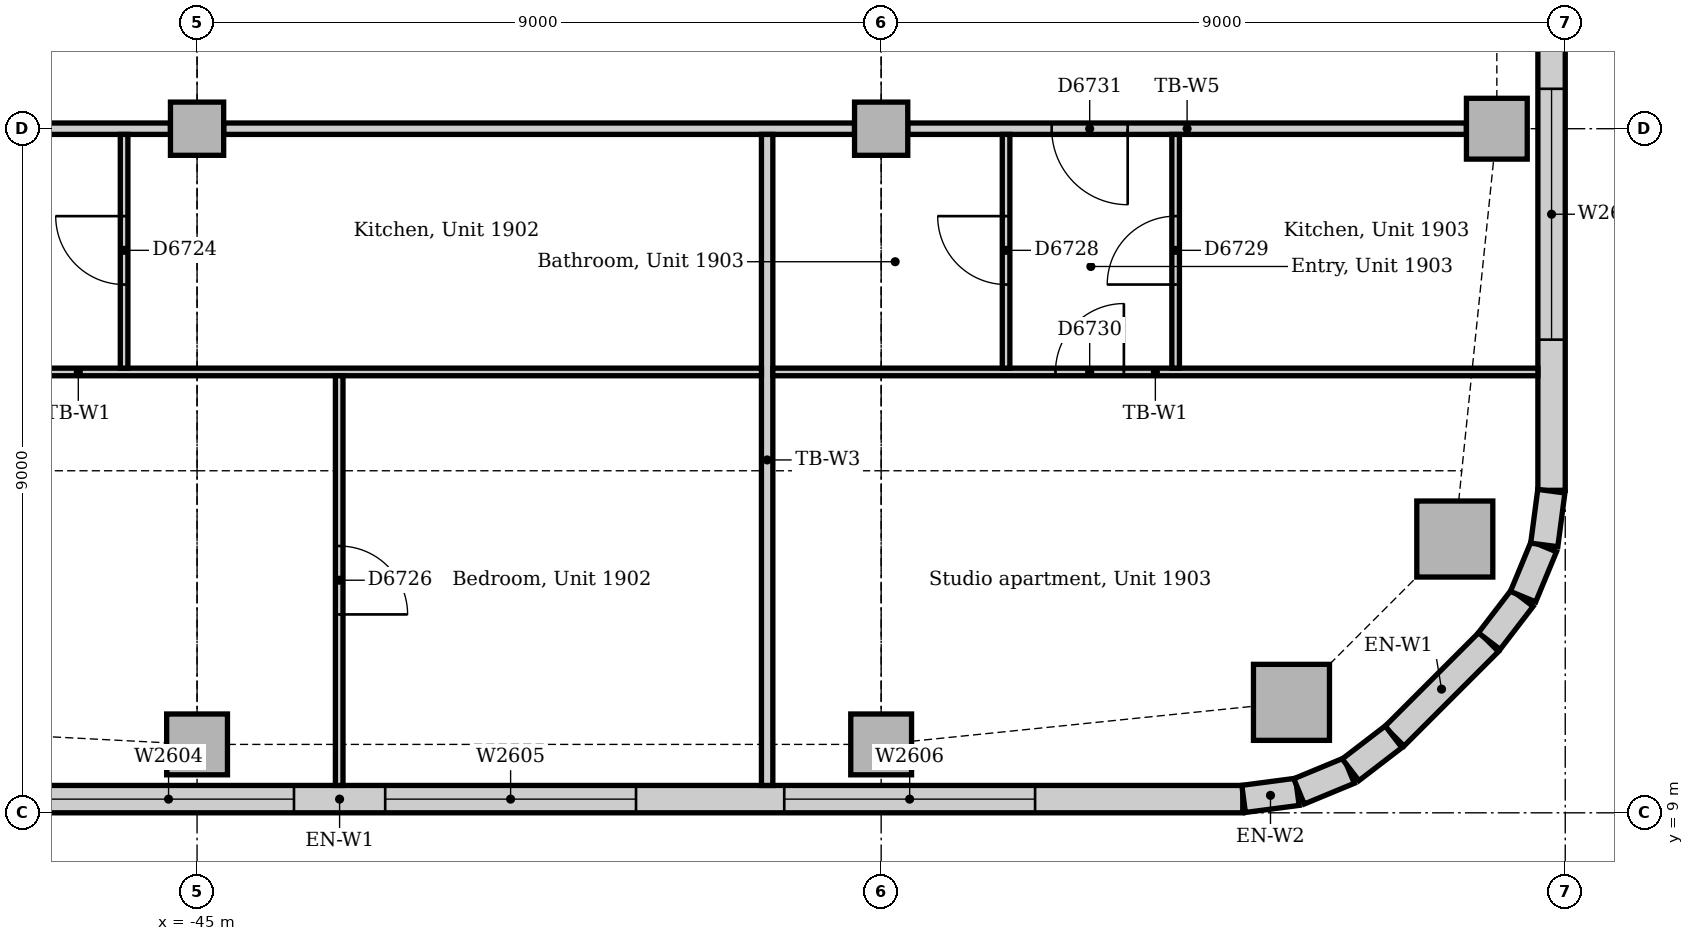
"""IFC4 building model, lengths in metres.
Left out: names, types, materials, properties, quantities, classifications, styles, units other than length and angle.
Written with IfcOpenShell. Run it as: python <this file> out.ifc"""

import sys

from ifc_helpers import new_model, si_unit, direction, frame, frame_2d, origin, origin_2d, place, context, subcontext, project, spatial, rectangle, extrude, element, fill, save


model = new_model("IFC4")
c1 = context("Model", 3, precision=1e-05, world=origin(), true_north=direction((0.0, 1.0)))
c2 = subcontext(c1, "Body", "Model", "MODEL_VIEW")
j1 = project(units=[si_unit("LENGTHUNIT", "METRE"), si_unit("PLANEANGLEUNIT", "RADIAN")], contexts=[c1])
p1 = place(None, origin())
s1 = spatial("IfcSite", under=j1, at=p1, CompositionType="ELEMENT")
p2 = place(p1, origin())
s2 = spatial("IfcBuilding", under=s1, at=p2, CompositionType="ELEMENT")
p3 = place(p2, frame((0.0, 0.0, 83.0)))
s3 = spatial("IfcBuildingStorey", under=s2, at=p3, CompositionType="ELEMENT", Elevation=83.0)
for number, where, z_axis, x_axis in (
    (1, (-30.602, 10.453, 0.0), (0.0, 0.0, 1.0), (1.0, 0.0, 0.0)),
    (2, (-28.453, 12.602, 0.0), (0.0, 0.0, 1.0), (1.0, 0.0, 0.0)),
):
    element("IfcColumn", number, at=place(p3, frame(where, z_axis=z_axis, x_axis=x_axis)), inside=s3, PredefinedType="COLUMN", context=c2, shape_type="SweptSolid", body=[
        extrude(rectangle(XDim=1.0, YDim=1.0, at=origin_2d()), origin(), (0.0, 0.0, 1.0), 3.85),
    ])
for number, where, z_axis, x_axis in (
    (3, (-45.0, 9.9, 0.0), (0.0, 0.0, 1.0), (1.0, 0.0, 0.0)),
    (4, (-36.0, 9.9, 0.0), (0.0, 0.0, 1.0), (1.0, 0.0, 0.0)),
    (5, (-27.9, 18.0, 0.0), (0.0, 0.0, 1.0), (1.0, 0.0, 0.0)),
):
    element("IfcColumn", number, at=place(p3, frame(where, z_axis=z_axis, x_axis=x_axis)), inside=s3, PredefinedType="COLUMN", context=c2, shape_type="SweptSolid", body=[
        extrude(rectangle(XDim=0.8, YDim=0.8, at=origin_2d()), origin(), (0.0, 0.0, 1.0), 3.85),
    ])
for number, where, z_axis, x_axis in (
    (6, (-45.0, 18.0, 0.0), (0.0, 0.0, 1.0), (1.0, 0.0, 0.0)),
    (7, (-36.0, 18.0, 0.0), (0.0, 0.0, 1.0), (1.0, 0.0, 0.0)),
):
    element("IfcColumn", number, at=place(p3, frame(where, z_axis=z_axis, x_axis=x_axis)), inside=s3, PredefinedType="COLUMN", context=c2, shape_type="SweptSolid", body=[
        extrude(rectangle(XDim=0.7, YDim=0.7, at=origin_2d()), origin(), (0.0, 0.0, 1.0), 3.85),
    ])
p4 = place(p3, frame((-55.007, 9.18, 0.0), z_axis=(0.0, 0.0, 1.0), x_axis=(1.0, 0.0, 0.0)))
e8 = element("IfcWall", 8, at=p4, inside=s3, PredefinedType="STANDARD", context=c2, shape_type="SweptSolid", body=[
    extrude(rectangle(XDim=23.765, YDim=0.36, at=frame_2d((11.882, 0.0))), origin(), (0.0, 0.0, 1.0), 3.85),
])
p5 = place(p4, frame((3.482, 0.0, 0.9)))
e9 = element("IfcOpeningElement", 9, at=p5, cuts=e8, PredefinedType="OPENING", context=c2, shape_type="SweptSolid", body=[
    extrude(rectangle(XDim=3.3, YDim=1.6, at=frame_2d((1.65, 0.8))), frame((0.0, 0.19, 0.0), z_axis=(0.0, -1.0, 0.0), x_axis=(1.0, 0.0, 0.0)), (0.0, 0.0, 1.0), 0.38),
])
p6 = place(p4, frame((7.982, 0.0, 0.9)))
e10 = element("IfcOpeningElement", 10, at=p6, cuts=e8, PredefinedType="OPENING", context=c2, shape_type="SweptSolid", body=[
    extrude(rectangle(XDim=3.3, YDim=1.6, at=frame_2d((1.65, 0.8))), frame((0.0, 0.19, 0.0), z_axis=(0.0, -1.0, 0.0), x_axis=(1.0, 0.0, 0.0)), (0.0, 0.0, 1.0), 0.38),
])
p7 = place(p4, frame((12.482, 0.0, 0.9)))
e11 = element("IfcOpeningElement", 11, at=p7, cuts=e8, PredefinedType="OPENING", context=c2, shape_type="SweptSolid", body=[
    extrude(rectangle(XDim=3.3, YDim=1.6, at=frame_2d((1.65, 0.8))), frame((0.0, 0.19, 0.0), z_axis=(0.0, -1.0, 0.0), x_axis=(1.0, 0.0, 0.0)), (0.0, 0.0, 1.0), 0.38),
])
p8 = place(p4, frame((17.732, 0.0, 0.9)))
e12 = element("IfcOpeningElement", 12, at=p8, cuts=e8, PredefinedType="OPENING", context=c2, shape_type="SweptSolid", body=[
    extrude(rectangle(XDim=3.3, YDim=1.6, at=frame_2d((1.65, 0.8))), frame((0.0, 0.19, 0.0), z_axis=(0.0, -1.0, 0.0), x_axis=(1.0, 0.0, 0.0)), (0.0, 0.0, 1.0), 0.38),
])
p9 = place(p3, frame((-29.249, 10.006, 0.0), z_axis=(0.0, 0.0, 1.0), x_axis=(0.707106781187, 0.707106781187, 0.0)))
e13 = element("IfcWall", 13, at=p9, inside=s3, PredefinedType="STANDARD", context=c2, shape_type="SweptSolid", body=[
    extrude(rectangle(XDim=1.757, YDim=0.36, at=frame_2d((0.879, 0.0))), origin(), (0.0, 0.0, 1.0), 3.85),
])
p10 = place(p3, frame((-27.18, 13.243, 0.0), z_axis=(0.0, 0.0, 1.0), x_axis=(0.0, 1.0, 0.0)))
e14 = element("IfcWall", 14, at=p10, inside=s3, PredefinedType="STANDARD", context=c2, shape_type="SweptSolid", body=[
    extrude(rectangle(XDim=7.757, YDim=0.36, at=frame_2d((3.879, 0.0))), origin(), (0.0, 0.0, 1.0), 3.85),
])
p11 = place(p10, frame((1.982, 0.0, 0.9)))
e15 = element("IfcOpeningElement", 15, at=p11, cuts=e14, PredefinedType="OPENING", context=c2, shape_type="SweptSolid", body=[
    extrude(rectangle(XDim=3.3, YDim=1.6, at=frame_2d((1.65, 0.8))), frame((0.0, 0.19, 0.0), z_axis=(0.0, -1.0, 0.0), x_axis=(1.0, 0.0, 0.0)), (0.0, 0.0, 1.0), 0.38),
])
for number, where, z_axis, x_axis in (
    (16, (-31.231, 9.183, 0.0), (0.0, 0.0, 1.0), (0.991, 0.131, 0.0)),
    (17, (-30.503, 9.282, 0.0), (0.0, 0.0, 1.0), (0.924, 0.383, 0.0)),
):
    element("IfcWall", number, at=place(p3, frame(where, z_axis=z_axis, x_axis=x_axis)), inside=s3, PredefinedType="STANDARD", context=c2, shape_type="SweptSolid", body=[
        extrude(rectangle(XDim=0.713, YDim=0.36, at=frame_2d((0.356, 0.0))), origin(), (0.0, 0.0, 1.0), 3.85),
    ])
for number, where, z_axis, x_axis in (
    (18, (-29.825, 9.566, 0.0), (0.0, 0.0, 1.0), (0.793, 0.609, 0.0)),
    (19, (-28.0, 11.259, 0.0), (0.0, 0.0, 1.0), (0.609, 0.793, 0.0)),
):
    element("IfcWall", number, at=place(p3, frame(where, z_axis=z_axis, x_axis=x_axis)), inside=s3, PredefinedType="STANDARD", context=c2, shape_type="SweptSolid", body=[
        extrude(rectangle(XDim=0.713, YDim=0.36, at=frame_2d((0.357, 0.0))), origin(), (0.0, 0.0, 1.0), 3.85),
    ])
for number, where, z_axis, x_axis in (
    (20, (-27.555, 11.844, 0.0), (0.0, 0.0, 1.0), (0.383, 0.924, 0.0)),
    (21, (-27.276, 12.524, 0.0), (0.0, 0.0, 1.0), (0.131, 0.991, 0.0)),
):
    element("IfcWall", number, at=place(p3, frame(where, z_axis=z_axis, x_axis=x_axis)), inside=s3, PredefinedType="STANDARD", context=c2, shape_type="SweptSolid", body=[
        extrude(rectangle(XDim=0.713, YDim=0.36, at=frame_2d((0.356, 0.0))), origin(), (0.0, 0.0, 1.0), 3.85),
    ])
p12 = place(p3, frame((-35.65, 18.0, 0.0), z_axis=(0.0, 0.0, 1.0), x_axis=(1.0, 0.0, 0.0)))
e22 = element("IfcWall", 22, at=p12, inside=s3, PredefinedType="PARTITIONING", context=c2, shape_type="SweptSolid", body=[
    extrude(rectangle(XDim=7.35, YDim=0.15, at=frame_2d((3.675, 0.0))), origin(), (0.0, 0.0, 1.0), 3.158),
])
p13 = place(p12, frame((1.893, 0.0, 0.0)))
e23 = element("IfcOpeningElement", 23, at=p13, cuts=e22, PredefinedType="OPENING", context=c2, shape_type="SweptSolid", body=[
    extrude(rectangle(XDim=1.0, YDim=2.1, at=frame_2d((0.5, 1.05))), frame((0.0, 0.085, 0.0), z_axis=(0.0, -1.0, 0.0), x_axis=(1.0, 0.0, 0.0)), (0.0, 0.0, 1.0), 0.17),
])
p14 = place(p3, frame((-44.65, 18.0, 0.0), z_axis=(0.0, 0.0, 1.0), x_axis=(1.0, 0.0, 0.0)))
e24 = element("IfcWall", 24, at=p14, inside=s3, PredefinedType="PARTITIONING", context=c2, shape_type="SweptSolid", body=[
    extrude(rectangle(XDim=8.3, YDim=0.15, at=frame_2d((4.15, 0.0))), origin(), (0.0, 0.0, 1.0), 3.158),
])
p15 = place(p3, frame((-53.65, 18.0, 0.0), z_axis=(0.0, 0.0, 1.0), x_axis=(1.0, 0.0, 0.0)))
e25 = element("IfcWall", 25, at=p15, inside=s3, PredefinedType="PARTITIONING", context=c2, shape_type="SweptSolid", body=[
    extrude(rectangle(XDim=8.3, YDim=0.15, at=frame_2d((4.15, 0.0))), origin(), (0.0, 0.0, 1.0), 3.158),
])
p16 = place(p15, frame((5.23, 0.0, 0.0)))
e26 = element("IfcOpeningElement", 26, at=p16, cuts=e25, PredefinedType="OPENING", context=c2, shape_type="SweptSolid", body=[
    extrude(rectangle(XDim=1.0, YDim=2.1, at=frame_2d((0.5, 1.05))), frame((0.0, 0.085, 0.0), z_axis=(0.0, -1.0, 0.0), x_axis=(1.0, 0.0, 0.0)), (0.0, 0.0, 1.0), 0.17),
])
p17 = place(p3, frame((-37.5, 9.36, 0.0), z_axis=(0.0, 0.0, 1.0), x_axis=(0.0, 1.0, 0.0)))
e27 = element("IfcWall", 27, at=p17, inside=s3, PredefinedType="PARTITIONING", context=c2, shape_type="SweptSolid", body=[
    extrude(rectangle(XDim=8.565, YDim=0.15, at=frame_2d((4.282, 0.0))), origin(), (0.0, 0.0, 1.0), 3.85),
])
p18 = place(p3, frame((-55.55, 14.8, 0.0), z_axis=(0.0, 0.0, 1.0), x_axis=(1.0, 0.0, 0.0)))
e28 = element("IfcWall", 28, at=p18, inside=s3, PredefinedType="PARTITIONING", context=c2, shape_type="SweptSolid", body=[
    extrude(rectangle(XDim=17.975, YDim=0.1, at=frame_2d((8.988, 0.0))), origin(), (0.0, 0.0, 1.0), 3.85),
])
p19 = place(p18, frame((7.18, 0.0, 0.0)))
e29 = element("IfcOpeningElement", 29, at=p19, cuts=e28, PredefinedType="OPENING", context=c2, shape_type="SweptSolid", body=[
    extrude(rectangle(XDim=0.9, YDim=2.1, at=frame_2d((0.45, 1.05))), frame((0.0, 0.06, 0.0), z_axis=(0.0, -1.0, 0.0), x_axis=(1.0, 0.0, 0.0)), (0.0, 0.0, 1.0), 0.12),
])
p20 = place(p3, frame((-37.425, 14.8, 0.0), z_axis=(0.0, 0.0, 1.0), x_axis=(1.0, 0.0, 0.0)))
e30 = element("IfcWall", 30, at=p20, inside=s3, PredefinedType="PARTITIONING", context=c2, shape_type="SweptSolid", body=[
    extrude(rectangle(XDim=10.065, YDim=0.1, at=frame_2d((5.032, 0.0))), origin(), (0.0, 0.0, 1.0), 3.85),
])
p21 = place(p20, frame((3.718, 0.0, 0.0)))
e31 = element("IfcOpeningElement", 31, at=p21, cuts=e30, PredefinedType="OPENING", context=c2, shape_type="SweptSolid", body=[
    extrude(rectangle(XDim=0.9, YDim=2.1, at=frame_2d((0.45, 1.05))), frame((0.0, 0.06, 0.0), z_axis=(0.0, -1.0, 0.0), x_axis=(1.0, 0.0, 0.0)), (0.0, 0.0, 1.0), 0.12),
])
p22 = place(p3, frame((-43.13, 9.36, 0.0), z_axis=(0.0, 0.0, 1.0), x_axis=(0.0, 1.0, 0.0)))
e32 = element("IfcWall", 32, at=p22, inside=s3, PredefinedType="PARTITIONING", context=c2, shape_type="SweptSolid", body=[
    extrude(rectangle(XDim=5.39, YDim=0.1, at=frame_2d((2.695, 0.0))), origin(), (0.0, 0.0, 1.0), 3.85),
])
p23 = place(p22, frame((2.25, 0.0, 0.0)))
e33 = element("IfcOpeningElement", 33, at=p23, cuts=e32, PredefinedType="OPENING", context=c2, shape_type="SweptSolid", body=[
    extrude(rectangle(XDim=0.9, YDim=2.1, at=frame_2d((0.45, 1.05))), frame((0.0, 0.06, 0.0), z_axis=(0.0, -1.0, 0.0), x_axis=(1.0, 0.0, 0.0)), (0.0, 0.0, 1.0), 0.12),
])
p24 = place(p3, frame((-45.96, 14.85, 0.0), z_axis=(0.0, 0.0, 1.0), x_axis=(0.0, 1.0, 0.0)))
e34 = element("IfcWall", 34, at=p24, inside=s3, PredefinedType="PARTITIONING", context=c2, shape_type="SweptSolid", body=[
    extrude(rectangle(XDim=3.075, YDim=0.1, at=frame_2d((1.538, 0.0))), origin(), (0.0, 0.0, 1.0), 3.85),
])
p25 = place(p24, frame((1.1, 0.0, 0.0)))
e35 = element("IfcOpeningElement", 35, at=p25, cuts=e34, PredefinedType="OPENING", context=c2, shape_type="SweptSolid", body=[
    extrude(rectangle(XDim=0.9, YDim=2.1, at=frame_2d((0.45, 1.05))), frame((0.0, 0.06, 0.0), z_axis=(0.0, -1.0, 0.0), x_axis=(1.0, 0.0, 0.0)), (0.0, 0.0, 1.0), 0.12),
])
p26 = place(p3, frame((-34.357, 14.85, 0.0), z_axis=(0.0, 0.0, 1.0), x_axis=(0.0, 1.0, 0.0)))
e36 = element("IfcWall", 36, at=p26, inside=s3, PredefinedType="PARTITIONING", context=c2, shape_type="SweptSolid", body=[
    extrude(rectangle(XDim=3.075, YDim=0.1, at=frame_2d((1.538, 0.0))), origin(), (0.0, 0.0, 1.0), 3.85),
])
p27 = place(p26, frame((1.1, 0.0, 0.0)))
e37 = element("IfcOpeningElement", 37, at=p27, cuts=e36, PredefinedType="OPENING", context=c2, shape_type="SweptSolid", body=[
    extrude(rectangle(XDim=0.9, YDim=2.1, at=frame_2d((0.45, 1.05))), frame((0.0, 0.06, 0.0), z_axis=(0.0, -1.0, 0.0), x_axis=(1.0, 0.0, 0.0)), (0.0, 0.0, 1.0), 0.12),
])
p28 = place(p3, frame((-32.126, 14.85, 0.0), z_axis=(0.0, 0.0, 1.0), x_axis=(0.0, 1.0, 0.0)))
e38 = element("IfcWall", 38, at=p28, inside=s3, PredefinedType="PARTITIONING", context=c2, shape_type="SweptSolid", body=[
    extrude(rectangle(XDim=3.075, YDim=0.1, at=frame_2d((1.538, 0.0))), origin(), (0.0, 0.0, 1.0), 3.85),
])
p29 = place(p28, frame((1.1, 0.0, 0.0)))
e39 = element("IfcOpeningElement", 39, at=p29, cuts=e38, PredefinedType="OPENING", context=c2, shape_type="SweptSolid", body=[
    extrude(rectangle(XDim=0.9, YDim=2.1, at=frame_2d((0.45, 1.05))), frame((0.0, 0.06, 0.0), z_axis=(0.0, -1.0, 0.0), x_axis=(1.0, 0.0, 0.0)), (0.0, 0.0, 1.0), 0.12),
])
p30 = place(p6, origin())
e40 = element("IfcWindow", 40, at=p30, inside=s3, PartitioningType="SINGLE_PANEL", PredefinedType="WINDOW", context=c2, shape_type="SweptSolid", body=[
    extrude(rectangle(XDim=3.3, YDim=1.6, at=frame_2d((1.65, 0.8))), frame((0.0, 0.13, 0.0), z_axis=(0.0, -1.0, 0.0), x_axis=(1.0, 0.0, 0.0)), (0.0, 0.0, 1.0), 0.06),
])
fill(e10, e40)
p31 = place(p7, origin())
e41 = element("IfcWindow", 41, at=p31, inside=s3, PartitioningType="SINGLE_PANEL", PredefinedType="WINDOW", context=c2, shape_type="SweptSolid", body=[
    extrude(rectangle(XDim=3.3, YDim=1.6, at=frame_2d((1.65, 0.8))), frame((0.0, 0.13, 0.0), z_axis=(0.0, -1.0, 0.0), x_axis=(1.0, 0.0, 0.0)), (0.0, 0.0, 1.0), 0.06),
])
fill(e11, e41)
p32 = place(p8, origin())
e42 = element("IfcWindow", 42, at=p32, inside=s3, PartitioningType="SINGLE_PANEL", PredefinedType="WINDOW", context=c2, shape_type="SweptSolid", body=[
    extrude(rectangle(XDim=3.3, YDim=1.6, at=frame_2d((1.65, 0.8))), frame((0.0, 0.13, 0.0), z_axis=(0.0, -1.0, 0.0), x_axis=(1.0, 0.0, 0.0)), (0.0, 0.0, 1.0), 0.06),
])
fill(e12, e42)
p33 = place(p11, origin())
e43 = element("IfcWindow", 43, at=p33, inside=s3, PartitioningType="SINGLE_PANEL", PredefinedType="WINDOW", context=c2, shape_type="SweptSolid", body=[
    extrude(rectangle(XDim=3.3, YDim=1.6, at=frame_2d((1.65, 0.8))), frame((0.0, 0.13, 0.0), z_axis=(0.0, -1.0, 0.0), x_axis=(1.0, 0.0, 0.0)), (0.0, 0.0, 1.0), 0.06),
])
fill(e15, e43)
p34 = place(p25, origin())
e44 = element("IfcDoor", 44, at=p34, inside=s3, OperationType="SINGLE_SWING_RIGHT", PredefinedType="DOOR", context=c2, shape_type="SweptSolid", body=[
    extrude(rectangle(XDim=0.9, YDim=2.1, at=frame_2d((0.45, 1.05))), frame((0.0, 0.025, 0.0), z_axis=(0.0, -1.0, 0.0), x_axis=(1.0, 0.0, 0.0)), (0.0, 0.0, 1.0), 0.05),
])
fill(e35, e44)
p35 = place(p23, frame((0.9, 0.0, 0.0), z_axis=(0.0, 0.0, 1.0), x_axis=(-1.0, 0.0, 0.0)))
e45 = element("IfcDoor", 45, at=p35, inside=s3, OperationType="SINGLE_SWING_RIGHT", PredefinedType="DOOR", context=c2, shape_type="SweptSolid", body=[
    extrude(rectangle(XDim=0.9, YDim=2.1, at=frame_2d((0.45, 1.05))), frame((0.0, 0.025, 0.0), z_axis=(0.0, -1.0, 0.0), x_axis=(1.0, 0.0, 0.0)), (0.0, 0.0, 1.0), 0.05),
])
fill(e33, e45)
p36 = place(p27, origin())
e46 = element("IfcDoor", 46, at=p36, inside=s3, OperationType="SINGLE_SWING_RIGHT", PredefinedType="DOOR", context=c2, shape_type="SweptSolid", body=[
    extrude(rectangle(XDim=0.9, YDim=2.1, at=frame_2d((0.45, 1.05))), frame((0.0, 0.025, 0.0), z_axis=(0.0, -1.0, 0.0), x_axis=(1.0, 0.0, 0.0)), (0.0, 0.0, 1.0), 0.05),
])
fill(e37, e46)
p37 = place(p29, origin())
e47 = element("IfcDoor", 47, at=p37, inside=s3, OperationType="SINGLE_SWING_LEFT", PredefinedType="DOOR", context=c2, shape_type="SweptSolid", body=[
    extrude(rectangle(XDim=0.9, YDim=2.1, at=frame_2d((0.45, 1.05))), frame((0.0, 0.025, 0.0), z_axis=(0.0, -1.0, 0.0), x_axis=(1.0, 0.0, 0.0)), (0.0, 0.0, 1.0), 0.05),
])
fill(e39, e47)
p38 = place(p21, origin())
e48 = element("IfcDoor", 48, at=p38, inside=s3, OperationType="SINGLE_SWING_RIGHT", PredefinedType="DOOR", context=c2, shape_type="SweptSolid", body=[
    extrude(rectangle(XDim=0.9, YDim=2.1, at=frame_2d((0.45, 1.05))), frame((0.0, 0.025, 0.0), z_axis=(0.0, -1.0, 0.0), x_axis=(1.0, 0.0, 0.0)), (0.0, 0.0, 1.0), 0.05),
])
fill(e31, e48)
p39 = place(p13, frame((1.0, 0.0, 0.0), z_axis=(0.0, 0.0, 1.0), x_axis=(-1.0, 0.0, 0.0)))
e49 = element("IfcDoor", 49, at=p39, inside=s3, OperationType="SINGLE_SWING_LEFT", PredefinedType="DOOR", context=c2, shape_type="SweptSolid", body=[
    extrude(rectangle(XDim=1.0, YDim=2.1, at=frame_2d((0.5, 1.05))), frame((0.0, 0.025, 0.0), z_axis=(0.0, -1.0, 0.0), x_axis=(1.0, 0.0, 0.0)), (0.0, 0.0, 1.0), 0.05),
])
fill(e23, e49)
save(model, sys.argv[1])
